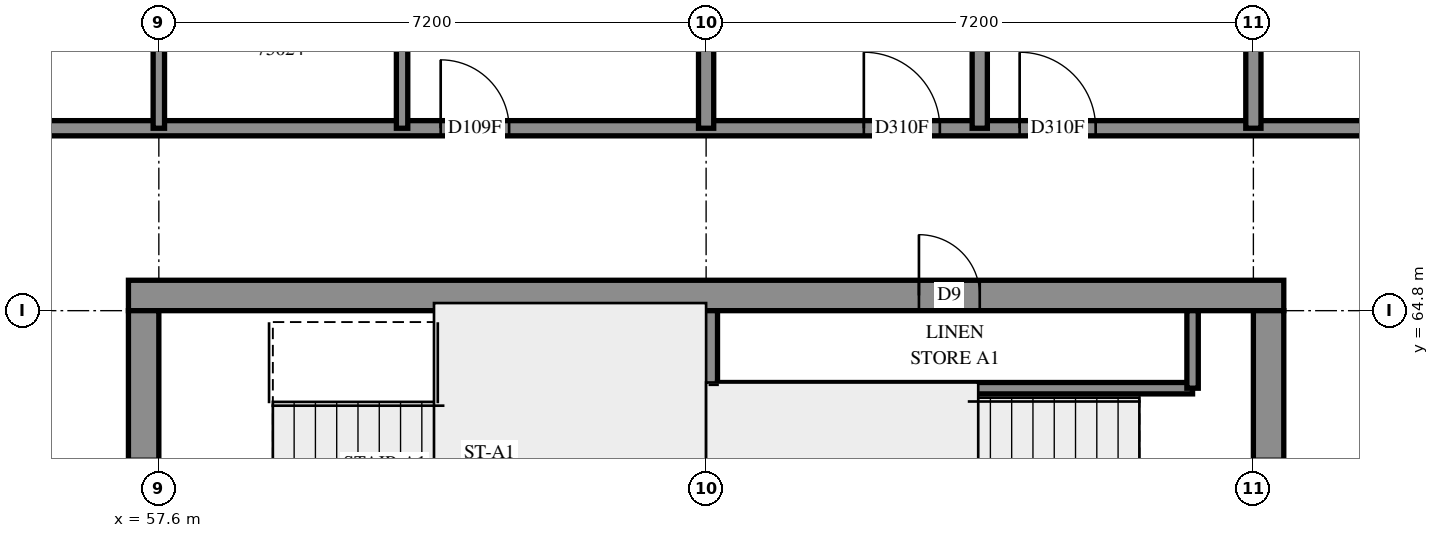
"""IFC4 building model, lengths in metres.
Left out: names, types, materials, properties, quantities, classifications, styles, units other than length and angle.
Written with IfcOpenShell. Run it as: python <this file> out.ifc"""

import sys

from ifc_helpers import new_model, si_unit, direction, frame, frame_2d, origin, place, context, subcontext, project, spatial, rectangle, extrude, element, fill, save


model = new_model("IFC4")
c1 = context("Model", 3, precision=1e-05, world=origin(), true_north=direction((0.0, 1.0)))
c2 = subcontext(c1, "Body", "Model", "MODEL_VIEW")
j1 = project(units=[si_unit("LENGTHUNIT", "METRE"), si_unit("PLANEANGLEUNIT", "RADIAN")], contexts=[c1])
p1 = place(None, origin())
s1 = spatial("IfcSite", under=j1, at=p1, CompositionType="ELEMENT")
p2 = place(p1, origin())
s2 = spatial("IfcBuilding", under=s1, at=p2, CompositionType="ELEMENT")
p3 = place(p2, frame((0.0, 0.0, 274.4)))
s3 = spatial("IfcBuildingStorey", under=s2, at=p3, CompositionType="ELEMENT", Elevation=274.4)
p4 = place(p3, frame((57.2, 65.0, -0.3), z_axis=(0.0, 0.0, 1.0), x_axis=(1.0, 0.0, 0.0)))
e1 = element("IfcWall", 1, at=p4, inside=s3, PredefinedType="SHEAR", context=c2, shape_type="SweptSolid", body=[
    extrude(rectangle(XDim=15.2, YDim=0.4, at=frame_2d((7.6, 0.0))), origin(), (0.0, 0.0, 1.0), 2.7),
])
p5 = place(p4, frame((10.4, 0.0, 0.3)))
e2 = element("IfcOpeningElement", 2, at=p5, cuts=e1, PredefinedType="OPENING", context=c2, shape_type="SweptSolid", body=[
    extrude(rectangle(XDim=0.8, YDim=2.1, at=frame_2d((0.4, 1.05))), frame((0.0, 0.21, 0.0), z_axis=(0.0, -1.0, 0.0), x_axis=(1.0, 0.0, 0.0)), (0.0, 0.0, 1.0), 0.42),
])
p6 = place(p3, frame((57.4, 50.4, -0.3), z_axis=(0.0, 0.0, 1.0), x_axis=(0.0, 1.0, 0.0)))
e3 = element("IfcWall", 3, at=p6, inside=s3, PredefinedType="SHEAR", context=c2, shape_type="SweptSolid", body=[
    extrude(rectangle(XDim=14.4, YDim=0.4, at=frame_2d((7.2, 0.0))), origin(), (0.0, 0.0, 1.0), 2.7),
])
p7 = place(p6, frame((4.55, 0.0, 0.3)))
e4 = element("IfcOpeningElement", 4, at=p7, cuts=e3, PredefinedType="OPENING", context=c2, shape_type="SweptSolid", body=[
    extrude(rectangle(XDim=1.1, YDim=2.1, at=frame_2d((0.55, 1.05))), frame((0.0, 0.21, 0.0), z_axis=(0.0, -1.0, 0.0), x_axis=(1.0, 0.0, 0.0)), (0.0, 0.0, 1.0), 0.42),
])
p8 = place(p6, frame((11.35, 0.0, 0.3)))
e5 = element("IfcOpeningElement", 5, at=p8, cuts=e3, PredefinedType="OPENING", context=c2, shape_type="SweptSolid", body=[
    extrude(rectangle(XDim=1.1, YDim=2.1, at=frame_2d((0.55, 1.05))), frame((0.0, 0.21, 0.0), z_axis=(0.0, -1.0, 0.0), x_axis=(1.0, 0.0, 0.0)), (0.0, 0.0, 1.0), 0.42),
])
p9 = place(p3, frame((72.2, 50.4, -0.3), z_axis=(0.0, 0.0, 1.0), x_axis=(0.0, 1.0, 0.0)))
e6 = element("IfcWall", 6, at=p9, inside=s3, PredefinedType="SHEAR", context=c2, shape_type="SweptSolid", body=[
    extrude(rectangle(XDim=14.4, YDim=0.4, at=frame_2d((7.2, 0.0))), origin(), (0.0, 0.0, 1.0), 2.7),
])
p10 = place(p9, frame((4.55, 0.0, 0.3)))
e7 = element("IfcOpeningElement", 7, at=p10, cuts=e6, PredefinedType="OPENING", context=c2, shape_type="SweptSolid", body=[
    extrude(rectangle(XDim=1.1, YDim=2.1, at=frame_2d((0.55, 1.05))), frame((0.0, 0.21, 0.0), z_axis=(0.0, -1.0, 0.0), x_axis=(1.0, 0.0, 0.0)), (0.0, 0.0, 1.0), 0.42),
])
p11 = place(p9, frame((11.35, 0.0, 0.3)))
e8 = element("IfcOpeningElement", 8, at=p11, cuts=e6, PredefinedType="OPENING", context=c2, shape_type="SweptSolid", body=[
    extrude(rectangle(XDim=1.1, YDim=2.1, at=frame_2d((0.55, 1.05))), frame((0.0, 0.21, 0.0), z_axis=(0.0, -1.0, 0.0), x_axis=(1.0, 0.0, 0.0)), (0.0, 0.0, 1.0), 0.42),
])
p12 = place(p3, frame((64.8, 60.6, 0.0), z_axis=(0.0, 0.0, 1.0), x_axis=(0.0, 1.0, 0.0)))
e9 = element("IfcWall", 9, at=p12, inside=s3, PredefinedType="SOLIDWALL", context=c2, shape_type="SweptSolid", body=[
    extrude(rectangle(XDim=4.2, YDim=0.3, at=frame_2d((2.1, 0.0))), origin(), (0.0, 0.0, 1.0), 3.1),
])
p13 = place(p3, frame((64.95, 63.78, 0.0), z_axis=(0.0, 0.0, 1.0), x_axis=(1.0, 0.0, 0.0)))
e10 = element("IfcWall", 10, at=p13, inside=s3, PredefinedType="PARTITIONING", context=c2, shape_type="SweptSolid", body=[
    extrude(rectangle(XDim=6.25, YDim=0.15, at=frame_2d((3.125, 0.0))), origin(), (0.0, 0.0, 1.0), 3.1),
])
p14 = place(p3, frame((71.2, 63.78, 0.0), z_axis=(0.0, 0.0, 1.0), x_axis=(0.0, 1.0, 0.0)))
e11 = element("IfcWall", 11, at=p14, inside=s3, PredefinedType="PARTITIONING", context=c2, shape_type="SweptSolid", body=[
    extrude(rectangle(XDim=1.02, YDim=0.15, at=frame_2d((0.51, 0.0))), origin(), (0.0, 0.0, 1.0), 3.1),
])
p15 = place(p3, frame((55.2, 67.2, 0.0), z_axis=(0.0, 0.0, 1.0), x_axis=(1.0, 0.0, 0.0)))
e12 = element("IfcWall", 12, at=p15, inside=s3, PredefinedType="PARTITIONING", context=c2, shape_type="SweptSolid", body=[
    extrude(rectangle(XDim=19.2, YDim=0.2, at=frame_2d((9.6, 0.0))), origin(), (0.0, 0.0, 1.0), 3.1),
])
p16 = place(p15, frame((6.108, 0.0, 0.0)))
e13 = element("IfcOpeningElement", 13, at=p16, cuts=e12, PredefinedType="OPENING", context=c2, shape_type="SweptSolid", body=[
    extrude(rectangle(XDim=0.9, YDim=2.1, at=frame_2d((0.45, 1.05))), frame((0.0, 0.11, 0.0), z_axis=(0.0, -1.0, 0.0), x_axis=(1.0, 0.0, 0.0)), (0.0, 0.0, 1.0), 0.22),
])
p17 = place(p15, frame((11.675, 0.0, 0.0)))
e14 = element("IfcOpeningElement", 14, at=p17, cuts=e12, PredefinedType="OPENING", context=c2, shape_type="SweptSolid", body=[
    extrude(rectangle(XDim=1.0, YDim=2.1, at=frame_2d((0.5, 1.05))), frame((0.0, 0.11, 0.0), z_axis=(0.0, -1.0, 0.0), x_axis=(1.0, 0.0, 0.0)), (0.0, 0.0, 1.0), 0.22),
])
p18 = place(p15, frame((13.725, 0.0, 0.0)))
e15 = element("IfcOpeningElement", 15, at=p18, cuts=e12, PredefinedType="OPENING", context=c2, shape_type="SweptSolid", body=[
    extrude(rectangle(XDim=1.0, YDim=2.1, at=frame_2d((0.5, 1.05))), frame((0.0, 0.11, 0.0), z_axis=(0.0, -1.0, 0.0), x_axis=(1.0, 0.0, 0.0)), (0.0, 0.0, 1.0), 0.22),
])
p19 = place(p3, frame((68.4, 67.2, 0.0), z_axis=(0.0, 0.0, 1.0), x_axis=(0.0, 1.0, 0.0)))
e16 = element("IfcWall", 16, at=p19, inside=s3, PredefinedType="PARTITIONING", context=c2, shape_type="SweptSolid", body=[
    extrude(rectangle(XDim=5.584, YDim=0.2, at=frame_2d((2.792, 0.0))), origin(), (0.0, 0.0, 1.0), 3.1),
])
for number, where, z_axis, x_axis in (
    (17, (64.8, 67.2, 0.0), (0.0, 0.0, 1.0), (0.0, 1.0, 0.0)),
    (18, (72.0, 67.2, 0.0), (0.0, 0.0, 1.0), (0.0, 1.0, 0.0)),
):
    element("IfcWall", number, at=place(p3, frame(where, z_axis=z_axis, x_axis=x_axis)), inside=s3, PredefinedType="PARTITIONING", context=c2, shape_type="SweptSolid", body=[
        extrude(rectangle(XDim=4.45, YDim=0.2, at=frame_2d((2.225, 0.0))), origin(), (0.0, 0.0, 1.0), 3.1),
    ])
for number, where, z_axis, x_axis in (
    (19, (60.8, 67.2, 0.0), (0.0, 0.0, 1.0), (0.0, 1.0, 0.0)),
    (20, (57.6, 67.2, 0.0), (0.0, 0.0, 1.0), (0.0, 1.0, 0.0)),
):
    element("IfcWall", number, at=place(p3, frame(where, z_axis=z_axis, x_axis=x_axis)), inside=s3, PredefinedType="PARTITIONING", context=c2, shape_type="SweptSolid", body=[
        extrude(rectangle(XDim=2.4, YDim=0.15, at=frame_2d((1.2, 0.0))), origin(), (0.0, 0.0, 1.0), 3.1),
    ])
p20 = place(p5, origin())
e21 = element("IfcDoor", 21, at=p20, inside=s3, OperationType="SINGLE_SWING_RIGHT", PredefinedType="DOOR", context=c2, shape_type="SweptSolid", body=[
    extrude(rectangle(XDim=0.8, YDim=2.1, at=frame_2d((0.4, 1.05))), frame((0.0, 0.025, 0.0), z_axis=(0.0, -1.0, 0.0), x_axis=(1.0, 0.0, 0.0)), (0.0, 0.0, 1.0), 0.05),
])
fill(e2, e21)
p21 = place(p16, origin())
e22 = element("IfcDoor", 22, at=p21, inside=s3, OperationType="SINGLE_SWING_RIGHT", PredefinedType="DOOR", context=c2, shape_type="SweptSolid", body=[
    extrude(rectangle(XDim=0.9, YDim=2.1, at=frame_2d((0.45, 1.05))), frame((0.0, 0.025, 0.0), z_axis=(0.0, -1.0, 0.0), x_axis=(1.0, 0.0, 0.0)), (0.0, 0.0, 1.0), 0.05),
])
fill(e13, e22)
p22 = place(p17, origin())
e23 = element("IfcDoor", 23, at=p22, inside=s3, OperationType="SINGLE_SWING_RIGHT", PredefinedType="DOOR", context=c2, shape_type="SweptSolid", body=[
    extrude(rectangle(XDim=1.0, YDim=2.1, at=frame_2d((0.5, 1.05))), frame((0.0, 0.025, 0.0), z_axis=(0.0, -1.0, 0.0), x_axis=(1.0, 0.0, 0.0)), (0.0, 0.0, 1.0), 0.05),
])
fill(e14, e23)
p23 = place(p18, origin())
e24 = element("IfcDoor", 24, at=p23, inside=s3, OperationType="SINGLE_SWING_LEFT", PredefinedType="DOOR", context=c2, shape_type="SweptSolid", body=[
    extrude(rectangle(XDim=1.0, YDim=2.1, at=frame_2d((0.5, 1.05))), frame((0.0, 0.025, 0.0), z_axis=(0.0, -1.0, 0.0), x_axis=(1.0, 0.0, 0.0)), (0.0, 0.0, 1.0), 0.05),
])
fill(e15, e24)
save(model, sys.argv[1])
